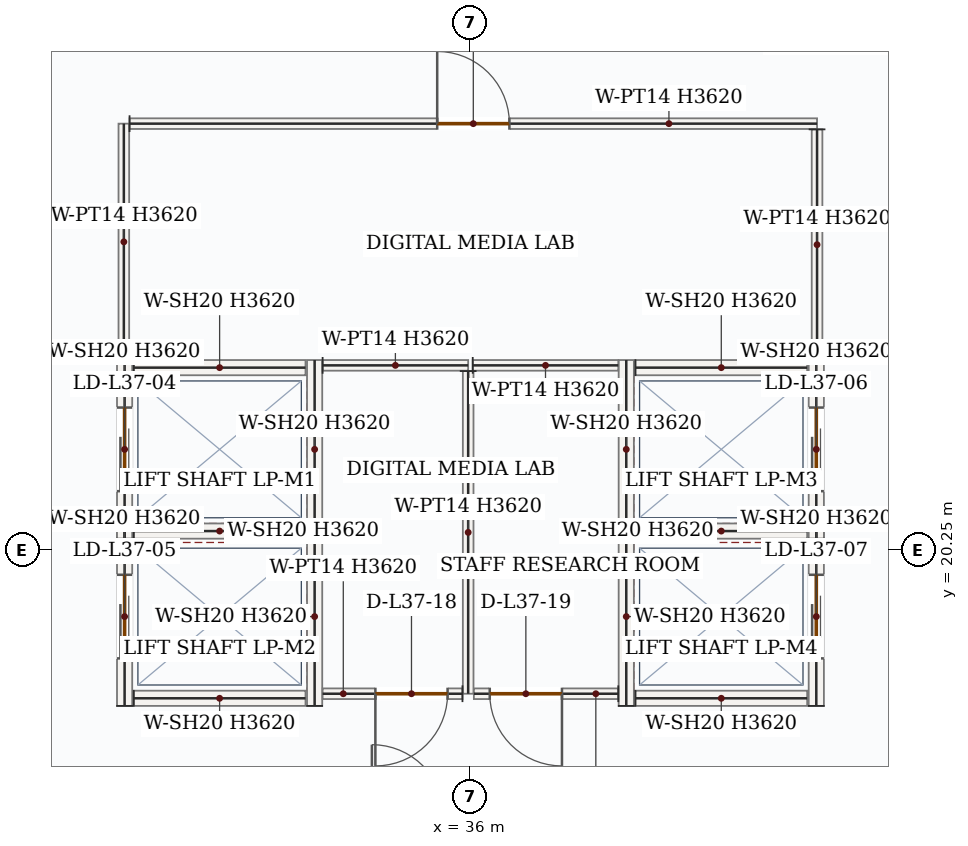
"""IFC4 building model, lengths in metres.
Left out: names, types, materials, properties, quantities, classifications, styles, units other than length and angle.
Written with IfcOpenShell. Run it as: python <this file> out.ifc"""

import sys

from ifc_helpers import new_model, si_unit, direction, frame, frame_2d, origin, place, context, subcontext, project, spatial, rectangle, extrude, source, transform, mapped, element, fill, save


model = new_model("IFC4")
c1 = context("Model", 3, precision=1e-05, world=origin(), true_north=direction((0.0, 1.0)))
c2 = subcontext(c1, "Body", "Model", "MODEL_VIEW")
j1 = project(units=[si_unit("LENGTHUNIT", "METRE"), si_unit("PLANEANGLEUNIT", "RADIAN")], contexts=[c1])
p1 = place(None, origin())
s1 = spatial("IfcSite", under=j1, at=p1, CompositionType="ELEMENT")
p2 = place(p1, origin())
s2 = spatial("IfcBuilding", under=s1, at=p2, CompositionType="ELEMENT")
p3 = place(p2, frame((0.0, 0.0, 162.9)))
s3 = spatial("IfcBuildingStorey", under=s2, at=p3, CompositionType="ELEMENT", Elevation=162.9)
p4 = place(p3, frame((31.45, 20.4, 0.0), z_axis=(0.0, 0.0, 1.0), x_axis=(0.0, 1.0, 0.0)))
e1 = element("IfcWall", 1, at=p4, inside=s3, PredefinedType="SOLIDWALL", context=c2, shape_type="SweptSolid", body=[
    extrude(rectangle(XDim=2.35, YDim=0.2, at=frame_2d((1.175, 0.0))), origin(), (0.0, 0.0, 1.0), 3.62),
])
p5 = place(p4, frame((0.625, 0.0, 0.0)))
e2 = element("IfcOpeningElement", 2, at=p5, cuts=e1, PredefinedType="OPENING", context=c2, shape_type="SweptSolid", body=[
    extrude(rectangle(XDim=1.1, YDim=2.15, at=frame_2d((0.55, 1.075))), frame((0.0, 0.11, 0.0), z_axis=(0.0, -1.0, 0.0), x_axis=(1.0, 0.0, 0.0)), (0.0, 0.0, 1.0), 0.22),
])
m1 = source(origin(), c2, "Body", "SweptSolid", [
    extrude(rectangle(XDim=2.35, YDim=0.2, at=frame_2d((1.175, 0.0))), origin(), (0.0, 0.0, 1.0), 3.62),
])
p6 = place(p3, frame((33.95, 20.4, 0.0), z_axis=(0.0, 0.0, 1.0), x_axis=(0.0, 1.0, 0.0)))
e3 = element("IfcWall", 3, at=p6, inside=s3, PredefinedType="SOLIDWALL", context=c2, shape_type="MappedRepresentation", body=[
    mapped(m1, transform((0.0, 0.0, 0.0), x_axis=(1.0, 0.0, 0.0), y_axis=(0.0, 1.0, 0.0), z_axis=(0.0, 0.0, 1.0), scale=1.0)),
])
m2 = source(origin(), c2, "Body", "SweptSolid", [
    extrude(rectangle(XDim=2.26, YDim=0.2, at=frame_2d((1.13, 0.0))), origin(), (0.0, 0.0, 1.0), 3.62),
])
for number, where, z_axis, x_axis in (
    (4, (31.57, 20.5, 0.0), (0.0, 0.0, 1.0), (1.0, 0.0, 0.0)),
    (5, (31.57, 22.65, 0.0), (0.0, 0.0, 1.0), (1.0, 0.0, 0.0)),
):
    element("IfcWall", number, at=place(p3, frame(where, z_axis=z_axis, x_axis=x_axis)), inside=s3, PredefinedType="SOLIDWALL", context=c2, shape_type="MappedRepresentation", body=[
        mapped(m2, transform((0.0, 0.0, 0.0), x_axis=(1.0, 0.0, 0.0), y_axis=(0.0, 1.0, 0.0), z_axis=(0.0, 0.0, 1.0), scale=1.0)),
    ])
p7 = place(p3, frame((31.45, 18.2, 0.0), z_axis=(0.0, 0.0, 1.0), x_axis=(0.0, 1.0, 0.0)))
e6 = element("IfcWall", 6, at=p7, inside=s3, PredefinedType="SOLIDWALL", context=c2, shape_type="SweptSolid", body=[
    extrude(rectangle(XDim=2.35, YDim=0.2, at=frame_2d((1.175, 0.0))), origin(), (0.0, 0.0, 1.0), 3.62),
])
p8 = place(p7, frame((0.625, 0.0, 0.0)))
e7 = element("IfcOpeningElement", 7, at=p8, cuts=e6, PredefinedType="OPENING", context=c2, shape_type="SweptSolid", body=[
    extrude(rectangle(XDim=1.1, YDim=2.15, at=frame_2d((0.55, 1.075))), frame((0.0, 0.11, 0.0), z_axis=(0.0, -1.0, 0.0), x_axis=(1.0, 0.0, 0.0)), (0.0, 0.0, 1.0), 0.22),
])
p9 = place(p3, frame((33.95, 18.2, 0.0), z_axis=(0.0, 0.0, 1.0), x_axis=(0.0, 1.0, 0.0)))
e8 = element("IfcWall", 8, at=p9, inside=s3, PredefinedType="SOLIDWALL", context=c2, shape_type="MappedRepresentation", body=[
    mapped(m1, transform((0.0, 0.0, 0.0), x_axis=(1.0, 0.0, 0.0), y_axis=(0.0, 1.0, 0.0), z_axis=(0.0, 0.0, 1.0), scale=1.0)),
])
p10 = place(p3, frame((31.57, 18.3, 0.0), z_axis=(0.0, 0.0, 1.0), x_axis=(1.0, 0.0, 0.0)))
e9 = element("IfcWall", 9, at=p10, inside=s3, PredefinedType="SOLIDWALL", context=c2, shape_type="MappedRepresentation", body=[
    mapped(m2, transform((0.0, 0.0, 0.0), x_axis=(1.0, 0.0, 0.0), y_axis=(0.0, 1.0, 0.0), z_axis=(0.0, 0.0, 1.0), scale=1.0)),
])
p11 = place(p3, frame((38.05, 20.4, 0.0), z_axis=(0.0, 0.0, 1.0), x_axis=(0.0, 1.0, 0.0)))
e10 = element("IfcWall", 10, at=p11, inside=s3, PredefinedType="SOLIDWALL", context=c2, shape_type="MappedRepresentation", body=[
    mapped(m1, transform((0.0, 0.0, 0.0), x_axis=(1.0, 0.0, 0.0), y_axis=(0.0, 1.0, 0.0), z_axis=(0.0, 0.0, 1.0), scale=1.0)),
])
p12 = place(p3, frame((40.55, 20.4, 0.0), z_axis=(0.0, 0.0, 1.0), x_axis=(0.0, 1.0, 0.0)))
e11 = element("IfcWall", 11, at=p12, inside=s3, PredefinedType="SOLIDWALL", context=c2, shape_type="SweptSolid", body=[
    extrude(rectangle(XDim=2.35, YDim=0.2, at=frame_2d((1.175, 0.0))), origin(), (0.0, 0.0, 1.0), 3.62),
])
p13 = place(p12, frame((0.625, 0.0, 0.0)))
e12 = element("IfcOpeningElement", 12, at=p13, cuts=e11, PredefinedType="OPENING", context=c2, shape_type="SweptSolid", body=[
    extrude(rectangle(XDim=1.1, YDim=2.15, at=frame_2d((0.55, 1.075))), frame((0.0, 0.11, 0.0), z_axis=(0.0, -1.0, 0.0), x_axis=(1.0, 0.0, 0.0)), (0.0, 0.0, 1.0), 0.22),
])
for number, where, z_axis, x_axis in (
    (13, (38.17, 20.5, 0.0), (0.0, 0.0, 1.0), (1.0, 0.0, 0.0)),
    (14, (38.17, 22.65, 0.0), (0.0, 0.0, 1.0), (1.0, 0.0, 0.0)),
):
    element("IfcWall", number, at=place(p3, frame(where, z_axis=z_axis, x_axis=x_axis)), inside=s3, PredefinedType="SOLIDWALL", context=c2, shape_type="MappedRepresentation", body=[
        mapped(m2, transform((0.0, 0.0, 0.0), x_axis=(1.0, 0.0, 0.0), y_axis=(0.0, 1.0, 0.0), z_axis=(0.0, 0.0, 1.0), scale=1.0)),
    ])
p14 = place(p3, frame((38.05, 18.2, 0.0), z_axis=(0.0, 0.0, 1.0), x_axis=(0.0, 1.0, 0.0)))
e15 = element("IfcWall", 15, at=p14, inside=s3, PredefinedType="SOLIDWALL", context=c2, shape_type="MappedRepresentation", body=[
    mapped(m1, transform((0.0, 0.0, 0.0), x_axis=(1.0, 0.0, 0.0), y_axis=(0.0, 1.0, 0.0), z_axis=(0.0, 0.0, 1.0), scale=1.0)),
])
p15 = place(p3, frame((40.55, 18.2, 0.0), z_axis=(0.0, 0.0, 1.0), x_axis=(0.0, 1.0, 0.0)))
e16 = element("IfcWall", 16, at=p15, inside=s3, PredefinedType="SOLIDWALL", context=c2, shape_type="SweptSolid", body=[
    extrude(rectangle(XDim=2.35, YDim=0.2, at=frame_2d((1.175, 0.0))), origin(), (0.0, 0.0, 1.0), 3.62),
])
p16 = place(p15, frame((0.625, 0.0, 0.0)))
e17 = element("IfcOpeningElement", 17, at=p16, cuts=e16, PredefinedType="OPENING", context=c2, shape_type="SweptSolid", body=[
    extrude(rectangle(XDim=1.1, YDim=2.15, at=frame_2d((0.55, 1.075))), frame((0.0, 0.11, 0.0), z_axis=(0.0, -1.0, 0.0), x_axis=(1.0, 0.0, 0.0)), (0.0, 0.0, 1.0), 0.22),
])
p17 = place(p3, frame((38.17, 18.3, 0.0), z_axis=(0.0, 0.0, 1.0), x_axis=(1.0, 0.0, 0.0)))
e18 = element("IfcWall", 18, at=p17, inside=s3, PredefinedType="SOLIDWALL", context=c2, shape_type="MappedRepresentation", body=[
    mapped(m2, transform((0.0, 0.0, 0.0), x_axis=(1.0, 0.0, 0.0), y_axis=(0.0, 1.0, 0.0), z_axis=(0.0, 0.0, 1.0), scale=1.0)),
])
m3 = source(origin(), c2, "Body", "SweptSolid", [
    extrude(rectangle(XDim=1.915, YDim=0.14, at=frame_2d((0.958, 0.0))), origin(), (0.0, 0.0, 1.0), 3.62),
])
p18 = place(p3, frame((34.055, 22.68, 0.0), z_axis=(0.0, 0.0, 1.0), x_axis=(1.0, 0.0, 0.0)))
e19 = element("IfcWall", 19, at=p18, inside=s3, PredefinedType="PARTITIONING", context=c2, shape_type="MappedRepresentation", body=[
    mapped(m3, transform((0.0, 0.0, 0.0), x_axis=(1.0, 0.0, 0.0), y_axis=(0.0, 1.0, 0.0), z_axis=(0.0, 0.0, 1.0), scale=1.0)),
])
m4 = source(origin(), c2, "Body", "SweptSolid", [
    extrude(rectangle(XDim=4.245, YDim=0.14, at=frame_2d((2.123, 0.0))), origin(), (0.0, 0.0, 1.0), 3.62),
])
p19 = place(p3, frame((35.97, 22.605, 0.0), z_axis=(0.0, 0.0, 1.0), x_axis=(0.0, -1.0, 0.0)))
e20 = element("IfcWall", 20, at=p19, inside=s3, PredefinedType="PARTITIONING", context=c2, shape_type="MappedRepresentation", body=[
    mapped(m4, transform((0.0, 0.0, 0.0), x_axis=(1.0, 0.0, 0.0), y_axis=(0.0, 1.0, 0.0), z_axis=(0.0, 0.0, 1.0), scale=1.0)),
])
p20 = place(p3, frame((35.895, 18.36, 0.0), z_axis=(0.0, 0.0, 1.0), x_axis=(-1.0, 0.0, 0.0)))
e21 = element("IfcWall", 21, at=p20, inside=s3, PredefinedType="PARTITIONING", context=c2, shape_type="SweptSolid", body=[
    extrude(rectangle(XDim=1.84, YDim=0.14, at=frame_2d((0.92, 0.0))), origin(), (0.0, 0.0, 1.0), 3.62),
])
p21 = place(p20, frame((0.196, 0.0, 0.0)))
e22 = element("IfcOpeningElement", 22, at=p21, cuts=e21, PredefinedType="OPENING", context=c2, shape_type="SweptSolid", body=[
    extrude(rectangle(XDim=0.95, YDim=2.15, at=frame_2d((0.475, 1.075))), frame((0.0, 0.08, 0.0), z_axis=(0.0, -1.0, 0.0), x_axis=(1.0, 0.0, 0.0)), (0.0, 0.0, 1.0), 0.16),
])
p22 = place(p3, frame((36.03, 22.68, 0.0), z_axis=(0.0, 0.0, 1.0), x_axis=(1.0, 0.0, 0.0)))
e23 = element("IfcWall", 23, at=p22, inside=s3, PredefinedType="PARTITIONING", context=c2, shape_type="MappedRepresentation", body=[
    mapped(m3, transform((0.0, 0.0, 0.0), x_axis=(1.0, 0.0, 0.0), y_axis=(0.0, 1.0, 0.0), z_axis=(0.0, 0.0, 1.0), scale=1.0)),
])
p23 = place(p3, frame((37.945, 18.36, 0.0), z_axis=(0.0, 0.0, 1.0), x_axis=(-1.0, 0.0, 0.0)))
e24 = element("IfcWall", 24, at=p23, inside=s3, PredefinedType="PARTITIONING", context=c2, shape_type="SweptSolid", body=[
    extrude(rectangle(XDim=1.9, YDim=0.14, at=frame_2d((0.95, 0.0))), origin(), (0.0, 0.0, 1.0), 3.62),
])
p24 = place(p23, frame((0.741, 0.0, 0.0)))
e25 = element("IfcOpeningElement", 25, at=p24, cuts=e24, PredefinedType="OPENING", context=c2, shape_type="SweptSolid", body=[
    extrude(rectangle(XDim=0.95, YDim=2.15, at=frame_2d((0.475, 1.075))), frame((0.0, 0.08, 0.0), z_axis=(0.0, -1.0, 0.0), x_axis=(1.0, 0.0, 0.0)), (0.0, 0.0, 1.0), 0.16),
])
m5 = source(origin(), c2, "Body", "SweptSolid", [
    extrude(rectangle(XDim=3.11, YDim=0.14, at=frame_2d((1.555, 0.0))), origin(), (0.0, 0.0, 1.0), 3.62),
])
p25 = place(p3, frame((31.44, 22.75, 0.0), z_axis=(0.0, 0.0, 1.0), x_axis=(0.0, 1.0, 0.0)))
e26 = element("IfcWall", 26, at=p25, inside=s3, PredefinedType="PARTITIONING", context=c2, shape_type="MappedRepresentation", body=[
    mapped(m5, transform((0.0, 0.0, 0.0), x_axis=(1.0, 0.0, 0.0), y_axis=(0.0, 1.0, 0.0), z_axis=(0.0, 0.0, 1.0), scale=1.0)),
])
p26 = place(p3, frame((31.515, 25.86, 0.0), z_axis=(0.0, 0.0, 1.0), x_axis=(1.0, 0.0, 0.0)))
e27 = element("IfcWall", 27, at=p26, inside=s3, PredefinedType="PARTITIONING", context=c2, shape_type="SweptSolid", body=[
    extrude(rectangle(XDim=9.045, YDim=0.14, at=frame_2d((4.522, 0.0))), origin(), (0.0, 0.0, 1.0), 3.62),
])
p27 = place(p26, frame((4.048, 0.0, 0.0)))
e28 = element("IfcOpeningElement", 28, at=p27, cuts=e27, PredefinedType="OPENING", context=c2, shape_type="SweptSolid", body=[
    extrude(rectangle(XDim=0.95, YDim=2.15, at=frame_2d((0.475, 1.075))), frame((0.0, 0.08, 0.0), z_axis=(0.0, -1.0, 0.0), x_axis=(1.0, 0.0, 0.0)), (0.0, 0.0, 1.0), 0.16),
])
m6 = source(origin(), c2, "Body", "SweptSolid", [
    extrude(rectangle(XDim=3.035, YDim=0.14, at=frame_2d((1.518, 0.0))), origin(), (0.0, 0.0, 1.0), 3.62),
])
p28 = place(p3, frame((40.56, 25.785, 0.0), z_axis=(0.0, 0.0, 1.0), x_axis=(0.0, -1.0, 0.0)))
e29 = element("IfcWall", 29, at=p28, inside=s3, PredefinedType="PARTITIONING", context=c2, shape_type="MappedRepresentation", body=[
    mapped(m6, transform((0.0, 0.0, 0.0), x_axis=(1.0, 0.0, 0.0), y_axis=(0.0, 1.0, 0.0), z_axis=(0.0, 0.0, 1.0), scale=1.0)),
])
m7 = source(origin(), c2, "Body", "SweptSolid", [
    extrude(rectangle(XDim=1.1, YDim=2.15, at=frame_2d((0.55, 1.075))), frame((0.0, 0.025, 0.0), z_axis=(0.0, -1.0, 0.0), x_axis=(1.0, 0.0, 0.0)), (0.0, 0.0, 1.0), 0.05),
])
p29 = place(p5, origin())
e30 = element("IfcDoor", 30, at=p29, inside=s3, OperationType="DOUBLE_DOOR_SLIDING", PredefinedType="DOOR", context=c2, shape_type="MappedRepresentation", body=[
    mapped(m7, transform((0.0, 0.0, 0.0), x_axis=(1.0, 0.0, 0.0), y_axis=(0.0, 1.0, 0.0), z_axis=(0.0, 0.0, 1.0), scale=1.0)),
])
fill(e2, e30)
p30 = place(p8, origin())
e31 = element("IfcDoor", 31, at=p30, inside=s3, OperationType="DOUBLE_DOOR_SLIDING", PredefinedType="DOOR", context=c2, shape_type="MappedRepresentation", body=[
    mapped(m7, transform((0.0, 0.0, 0.0), x_axis=(1.0, 0.0, 0.0), y_axis=(0.0, 1.0, 0.0), z_axis=(0.0, 0.0, 1.0), scale=1.0)),
])
fill(e7, e31)
p31 = place(p13, origin())
e32 = element("IfcDoor", 32, at=p31, inside=s3, OperationType="DOUBLE_DOOR_SLIDING", PredefinedType="DOOR", context=c2, shape_type="MappedRepresentation", body=[
    mapped(m7, transform((0.0, 0.0, 0.0), x_axis=(1.0, 0.0, 0.0), y_axis=(0.0, 1.0, 0.0), z_axis=(0.0, 0.0, 1.0), scale=1.0)),
])
fill(e12, e32)
p32 = place(p16, origin())
e33 = element("IfcDoor", 33, at=p32, inside=s3, OperationType="DOUBLE_DOOR_SLIDING", PredefinedType="DOOR", context=c2, shape_type="MappedRepresentation", body=[
    mapped(m7, transform((0.0, 0.0, 0.0), x_axis=(1.0, 0.0, 0.0), y_axis=(0.0, 1.0, 0.0), z_axis=(0.0, 0.0, 1.0), scale=1.0)),
])
fill(e17, e33)
m8 = source(origin(), c2, "Body", "SweptSolid", [
    extrude(rectangle(XDim=0.95, YDim=2.15, at=frame_2d((0.475, 1.075))), frame((0.0, 0.025, 0.0), z_axis=(0.0, -1.0, 0.0), x_axis=(1.0, 0.0, 0.0)), (0.0, 0.0, 1.0), 0.05),
])
p33 = place(p27, origin())
e34 = element("IfcDoor", 34, at=p33, inside=s3, OperationType="SINGLE_SWING_LEFT", PredefinedType="DOOR", context=c2, shape_type="MappedRepresentation", body=[
    mapped(m8, transform((0.0, 0.0, 0.0), x_axis=(1.0, 0.0, 0.0), y_axis=(0.0, 1.0, 0.0), z_axis=(0.0, 0.0, 1.0), scale=1.0)),
])
fill(e28, e34)
p34 = place(p21, origin())
e35 = element("IfcDoor", 35, at=p34, inside=s3, OperationType="SINGLE_SWING_RIGHT", PredefinedType="DOOR", context=c2, shape_type="MappedRepresentation", body=[
    mapped(m8, transform((0.0, 0.0, 0.0), x_axis=(1.0, 0.0, 0.0), y_axis=(0.0, 1.0, 0.0), z_axis=(0.0, 0.0, 1.0), scale=1.0)),
])
fill(e22, e35)
p35 = place(p24, origin())
e36 = element("IfcDoor", 36, at=p35, inside=s3, OperationType="SINGLE_SWING_LEFT", PredefinedType="DOOR", context=c2, shape_type="MappedRepresentation", body=[
    mapped(m8, transform((0.0, 0.0, 0.0), x_axis=(1.0, 0.0, 0.0), y_axis=(0.0, 1.0, 0.0), z_axis=(0.0, 0.0, 1.0), scale=1.0)),
])
fill(e25, e36)
save(model, sys.argv[1])
